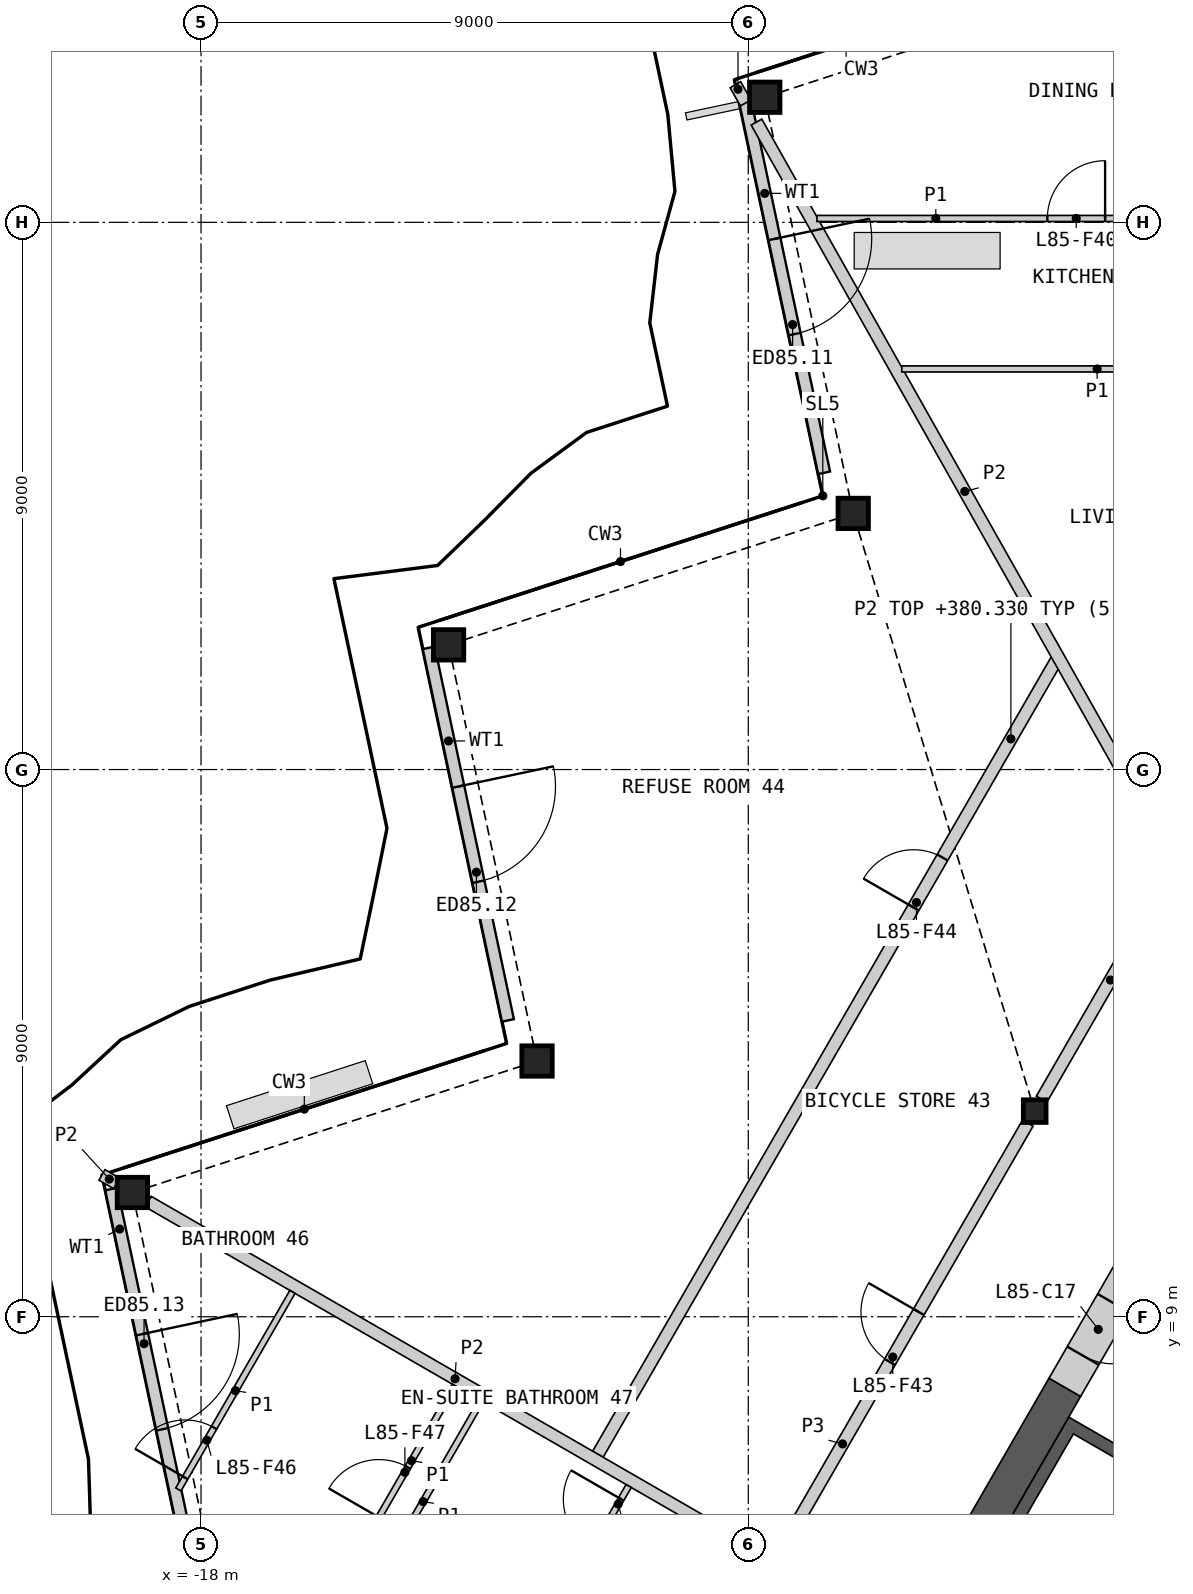
"""IFC4 building model, lengths in metres.
Left out: names, types, materials, properties, quantities, classifications, styles, units other than length and angle.
Written with IfcOpenShell. Run it as: python <this file> out.ifc"""

import sys

from ifc_helpers import new_model, si_unit, direction, frame, frame_2d, origin, origin_2d, place, context, subcontext, project, spatial, polyline, rectangle, hollow_rectangle, i_section, outline, extrude, element, fill, save


model = new_model("IFC4")
c1 = context("Model", 3, precision=1e-05, world=origin(), true_north=direction((0.0, 1.0)))
c2 = subcontext(c1, "Body", "Model", "MODEL_VIEW")
j1 = project(units=[si_unit("LENGTHUNIT", "METRE"), si_unit("PLANEANGLEUNIT", "RADIAN")], contexts=[c1])
p1 = place(None, origin())
s1 = spatial("IfcSite", under=j1, at=p1, CompositionType="ELEMENT")
p2 = place(p1, origin())
s2 = spatial("IfcBuilding", under=s1, at=p2, CompositionType="ELEMENT")
p3 = place(p2, frame((0.0, 0.0, 378.0)))
s3 = spatial("IfcBuildingStorey", under=s2, at=p3, CompositionType="ELEMENT", Elevation=378.0)
for number, where, z_axis, x_axis in (
    (1, (-8.729, 29.057, 0.0), (0.0, 0.0, 1.0), (1.0, 0.0, 0.0)),
    (2, (-7.274, 22.213, 0.0), (0.0, 0.0, 1.0), (1.0, 0.0, 0.0)),
    (3, (-13.929, 20.051, 0.0), (0.0, 0.0, 1.0), (1.0, 0.0, 0.0)),
    (4, (-12.474, 13.206, 0.0), (0.0, 0.0, 1.0), (1.0, 0.0, 0.0)),
    (5, (-19.129, 11.044, 0.0), (0.0, 0.0, 1.0), (1.0, 0.0, 0.0)),
):
    element("IfcColumn", number, at=place(p3, frame(where, z_axis=z_axis, x_axis=x_axis)), inside=s3, PredefinedType="COLUMN", context=c2, shape_type="SweptSolid", body=[
        extrude(hollow_rectangle(XDim=0.5, YDim=0.5, WallThickness=0.03, at=origin_2d()), origin(), (0.0, 0.0, 1.0), 3.4),
    ])
p4 = place(p3, frame((-4.289, 12.382, 0.0), z_axis=(0.0, 0.0, 1.0), x_axis=(1.0, 0.0, 0.0)))
e6 = element("IfcColumn", 6, at=p4, inside=s3, PredefinedType="COLUMN", context=c2, shape_type="SweptSolid", body=[
    extrude(i_section(OverallWidth=0.374, OverallDepth=0.372, WebThickness=0.016, FlangeThickness=0.026, at=origin_2d()), origin(), (0.0, 0.0, 1.0), 3.4),
])
p5 = place(p3, frame((-9.055, 29.009, 0.0), z_axis=(0.0, 0.0, 1.0), x_axis=(0.207926797195, -0.978144389652, 0.0)))
e7 = element("IfcWall", 7, at=p5, inside=s3, PredefinedType="SOLIDWALL", context=c2, shape_type="SweptSolid", body=[
    extrude(rectangle(XDim=6.265, YDim=0.2, at=frame_2d((3.133, 0.0))), origin(), (0.0, 0.0, 1.0), 2.634),
])
p6 = place(p5, frame((2.333, 0.0, 0.0)))
e8 = element("IfcOpeningElement", 8, at=p6, cuts=e7, PredefinedType="OPENING", context=c2, shape_type="SweptSolid", body=[
    extrude(rectangle(XDim=1.6, YDim=2.25, at=frame_2d((0.8, 1.125))), frame((0.0, 0.11, 0.0), z_axis=(0.0, -1.0, 0.0), x_axis=(1.0, 0.0, 0.0)), (0.0, 0.0, 1.0), 0.22),
])
p7 = place(p3, frame((-14.255, 20.002, 0.0), z_axis=(0.0, 0.0, 1.0), x_axis=(0.207926797195, -0.978144389652, 0.0)))
e9 = element("IfcWall", 9, at=p7, inside=s3, PredefinedType="SOLIDWALL", context=c2, shape_type="SweptSolid", body=[
    extrude(rectangle(XDim=6.265, YDim=0.2, at=frame_2d((3.133, 0.0))), origin(), (0.0, 0.0, 1.0), 2.634),
])
p8 = place(p7, frame((2.333, 0.0, 0.0)))
e10 = element("IfcOpeningElement", 10, at=p8, cuts=e9, PredefinedType="OPENING", context=c2, shape_type="SweptSolid", body=[
    extrude(rectangle(XDim=1.6, YDim=2.25, at=frame_2d((0.8, 1.125))), frame((0.0, 0.11, 0.0), z_axis=(0.0, -1.0, 0.0), x_axis=(1.0, 0.0, 0.0)), (0.0, 0.0, 1.0), 0.22),
])
p9 = place(p3, frame((-19.477, 11.1, 0.0), z_axis=(0.0, 0.0, 1.0), x_axis=(0.207910061304, -0.978147947096, 0.0)))
e11 = element("IfcWall", 11, at=p9, inside=s3, PredefinedType="SOLIDWALL", context=c2, shape_type="SweptSolid", body=[
    extrude(rectangle(XDim=6.716, YDim=0.2, at=frame_2d((3.358, 0.0))), origin(), (0.0, 0.0, 1.0), 2.634),
])
p10 = place(p9, frame((2.439, 0.0, 0.0)))
e12 = element("IfcOpeningElement", 12, at=p10, cuts=e11, PredefinedType="OPENING", context=c2, shape_type="SweptSolid", body=[
    extrude(rectangle(XDim=1.6, YDim=2.25, at=frame_2d((0.8, 1.125))), frame((0.0, 0.11, 0.0), z_axis=(0.0, -1.0, 0.0), x_axis=(1.0, 0.0, 0.0)), (0.0, 0.0, 1.0), 0.22),
])
p11 = place(p3, origin())
e13 = element("IfcWall", 13, at=p11, inside=s3, PredefinedType="SHEAR", context=c2, shape_type="SweptSolid", body=[
    extrude(outline(polyline([(-4.96, 0.208), (-7.131, 1.461), (-3.731, 7.35), (-1.561, 6.097), (-1.66, 5.924), (-3.652, 7.074), (-6.852, 1.531), (-4.861, 0.381), (-4.96, 0.208)])), origin(), (0.0, 0.0, 1.0), 3.1),
])
p12 = place(p3, frame((-1.631, 5.776, 0.0), z_axis=(0.0, 0.0, 1.0), x_axis=(-0.499992876559, -0.866029516466, 0.0)))
e14 = element("IfcWall", 14, at=p12, inside=s3, PredefinedType="SOLIDWALL", context=c2, shape_type="SweptSolid", body=[
    extrude(rectangle(XDim=6.486, YDim=0.2, at=frame_2d((3.243, 0.0))), origin(), (0.0, 0.0, 1.0), 3.1),
])
p13 = place(p12, frame((2.637, 0.0, 0.0)))
e15 = element("IfcOpeningElement", 15, at=p13, cuts=e14, PredefinedType="OPENING", context=c2, shape_type="SweptSolid", body=[
    extrude(rectangle(XDim=0.9, YDim=2.1, at=frame_2d((0.45, 1.05))), frame((0.0, 0.11, 0.0), z_axis=(0.0, -1.0, 0.0), x_axis=(1.0, 0.0, 0.0)), (0.0, 0.0, 1.0), 0.22),
])
p14 = place(p3, frame((-3.794, 7.84, 0.0), z_axis=(0.0, 0.0, 1.0), x_axis=(-0.499974747889, -0.866039982607, 0.0)))
e16 = element("IfcWall", 16, at=p14, inside=s3, PredefinedType="SHEAR", context=c2, shape_type="SweptSolid", body=[
    extrude(rectangle(XDim=7.092, YDim=0.6, at=frame_2d((3.546, 0.0))), origin(), (0.0, 0.0, 1.0), 3.1),
])
p15 = place(p3, frame((-2.694, 9.745, 0.0), z_axis=(0.0, 0.0, 1.0), x_axis=(-0.50002983664, -0.866008176907, 0.0)))
e17 = element("IfcWall", 17, at=p15, inside=s3, PredefinedType="SHEAR", context=c2, shape_type="SweptSolid", body=[
    extrude(rectangle(XDim=2.2, YDim=0.6, at=frame_2d((1.1, 0.0))), origin(), (0.0, 0.0, 1.0), 3.1),
])
p16 = place(p15, frame((0.6, 0.0, 0.0)))
e18 = element("IfcOpeningElement", 18, at=p16, cuts=e17, PredefinedType="OPENING", context=c2, shape_type="SweptSolid", body=[
    extrude(rectangle(XDim=1.0, YDim=2.1, at=frame_2d((0.5, 1.05))), frame((0.0, 0.31, 0.0), z_axis=(0.0, -1.0, 0.0), x_axis=(1.0, 0.0, 0.0)), (0.0, 0.0, 1.0), 0.62),
])
p17 = place(p3, frame((-8.465, 5.15, 0.0), z_axis=(0.0, 0.0, 1.0), x_axis=(0.499992155518, 0.866029932751, 0.0)))
e19 = element("IfcWall", 19, at=p17, inside=s3, PredefinedType="PARTITIONING", context=c2, shape_type="SweptSolid", body=[
    extrude(rectangle(XDim=8.123, YDim=0.2, at=frame_2d((4.062, 0.0))), origin(), (0.0, 0.0, 1.0), 3.1),
])
p18 = place(p17, frame((3.587, 0.0, 0.0)))
e20 = element("IfcOpeningElement", 20, at=p18, cuts=e19, PredefinedType="OPENING", context=c2, shape_type="SweptSolid", body=[
    extrude(rectangle(XDim=0.95, YDim=2.1, at=frame_2d((0.475, 1.05))), frame((0.0, 0.11, 0.0), z_axis=(0.0, -1.0, 0.0), x_axis=(1.0, 0.0, 0.0)), (0.0, 0.0, 1.0), 0.22),
])
p19 = place(p3, frame((-4.176, 12.579, 0.0), z_axis=(0.0, 0.0, 1.0), x_axis=(0.499974648164, 0.866040040179, 0.0)))
e21 = element("IfcWall", 21, at=p19, inside=s3, PredefinedType="PARTITIONING", context=c2, shape_type="SweptSolid", body=[
    extrude(rectangle(XDim=4.525, YDim=0.2, at=frame_2d((2.263, 0.0))), origin(), (0.0, 0.0, 1.0), 3.1),
])
p20 = place(p3, frame((-11.473, 6.74, 0.0), z_axis=(0.0, 0.0, 1.0), x_axis=(0.500001082559, 0.866024778768, 0.0)))
e22 = element("IfcWall", 22, at=p20, inside=s3, PredefinedType="PARTITIONING", context=c2, shape_type="SweptSolid", body=[
    extrude(rectangle(XDim=15.094, YDim=0.2, at=frame_2d((7.547, 0.0))), origin(), (0.0, 0.0, 1.0), 2.33),
])
p21 = place(p20, frame((10.383, 0.0, 0.0)))
e23 = element("IfcOpeningElement", 23, at=p21, cuts=e22, PredefinedType="OPENING", context=c2, shape_type="SweptSolid", body=[
    extrude(rectangle(XDim=0.95, YDim=2.1, at=frame_2d((0.475, 1.05))), frame((0.0, 0.11, 0.0), z_axis=(0.0, -1.0, 0.0), x_axis=(1.0, 0.0, 0.0)), (0.0, 0.0, 1.0), 0.22),
])
p22 = place(p3, frame((-8.865, 28.649, 0.0), z_axis=(0.0, 0.0, 1.0), x_axis=(0.491236420263, -0.871026279401, 0.0)))
e24 = element("IfcWall", 24, at=p22, inside=s3, PredefinedType="PARTITIONING", context=c2, shape_type="SweptSolid", body=[
    extrude(rectangle(XDim=13.95, YDim=0.2, at=frame_2d((6.975, 0.0))), origin(), (0.0, 0.0, 1.0), 2.33),
])
p23 = place(p3, frame((-18.869, 10.894, 0.0), z_axis=(0.0, 0.0, 1.0), x_axis=(0.866023724155, -0.500002909193, 0.0)))
e25 = element("IfcWall", 25, at=p23, inside=s3, PredefinedType="PARTITIONING", context=c2, shape_type="SweptSolid", body=[
    extrude(rectangle(XDim=11.655, YDim=0.2, at=frame_2d((5.827, 0.0))), origin(), (0.0, 0.0, 1.0), 2.33),
])
p24 = place(p3, frame((-9.211, 29.263, 0.0), z_axis=(0.0, 0.0, 1.0), x_axis=(0.4910719836, -0.871118996994, 0.0)))
e26 = element("IfcWall", 26, at=p24, inside=s3, PredefinedType="PARTITIONING", context=c2, shape_type="SweptSolid", body=[
    extrude(rectangle(XDim=0.343, YDim=0.2, at=frame_2d((0.171, 0.0))), origin(), (0.0, 0.0, 1.0), 2.33),
])
p25 = place(p3, frame((-19.629, 11.333, 0.0), z_axis=(0.0, 0.0, 1.0), x_axis=(0.866068339032, -0.499925626596, 0.0)))
e27 = element("IfcWall", 27, at=p25, inside=s3, PredefinedType="PARTITIONING", context=c2, shape_type="SweptSolid", body=[
    extrude(rectangle(XDim=0.277, YDim=0.2, at=frame_2d((0.139, 0.0))), origin(), (0.0, 0.0, 1.0), 2.33),
])
p26 = place(p3, frame((-7.871, 27.064, 0.0), z_axis=(0.0, 0.0, 1.0), x_axis=(1.0, 0.0, 0.0)))
e28 = element("IfcWall", 28, at=p26, inside=s3, PredefinedType="PARTITIONING", context=c2, shape_type="SweptSolid", body=[
    extrude(rectangle(XDim=7.821, YDim=0.1, at=frame_2d((3.91, 0.0))), origin(), (0.0, 0.0, 1.0), 2.33),
])
p27 = place(p26, frame((3.789, 0.0, 0.0)))
e29 = element("IfcOpeningElement", 29, at=p27, cuts=e28, PredefinedType="OPENING", context=c2, shape_type="SweptSolid", body=[
    extrude(rectangle(XDim=0.95, YDim=2.1, at=frame_2d((0.475, 1.05))), frame((0.0, 0.06, 0.0), z_axis=(0.0, -1.0, 0.0), x_axis=(1.0, 0.0, 0.0)), (0.0, 0.0, 1.0), 0.12),
])
p28 = place(p3, frame((-6.475, 24.589, 0.0), z_axis=(0.0, 0.0, 1.0), x_axis=(1.0, 0.0, 0.0)))
e30 = element("IfcWall", 30, at=p28, inside=s3, PredefinedType="PARTITIONING", context=c2, shape_type="SweptSolid", body=[
    extrude(rectangle(XDim=6.425, YDim=0.1, at=frame_2d((3.212, 0.0))), origin(), (0.0, 0.0, 1.0), 2.33),
])
p29 = place(p28, frame((3.499, 0.0, 0.0)))
e31 = element("IfcOpeningElement", 31, at=p29, cuts=e30, PredefinedType="OPENING", context=c2, shape_type="SweptSolid", body=[
    extrude(rectangle(XDim=0.95, YDim=2.1, at=frame_2d((0.475, 1.05))), frame((0.0, 0.06, 0.0), z_axis=(0.0, -1.0, 0.0), x_axis=(1.0, 0.0, 0.0)), (0.0, 0.0, 1.0), 0.12),
])
p30 = place(p3, frame((-18.372, 6.16, 0.0), z_axis=(0.0, 0.0, 1.0), x_axis=(0.499981580887, 0.866036037803, 0.0)))
e32 = element("IfcWall", 32, at=p30, inside=s3, PredefinedType="PARTITIONING", context=c2, shape_type="SweptSolid", body=[
    extrude(rectangle(XDim=3.752, YDim=0.1, at=frame_2d((1.876, 0.0))), origin(), (0.0, 0.0, 1.0), 2.33),
])
p31 = place(p30, frame((0.222, 0.0, 0.0)))
e33 = element("IfcOpeningElement", 33, at=p31, cuts=e32, PredefinedType="OPENING", context=c2, shape_type="SweptSolid", body=[
    extrude(rectangle(XDim=0.95, YDim=2.1, at=frame_2d((0.475, 1.05))), frame((0.0, 0.06, 0.0), z_axis=(0.0, -1.0, 0.0), x_axis=(1.0, 0.0, 0.0)), (0.0, 0.0, 1.0), 0.12),
])
p32 = place(p3, frame((-15.25, 5.398, 0.0), z_axis=(0.0, 0.0, 1.0), x_axis=(0.499935029643, 0.866062911188, 0.0)))
e34 = element("IfcWall", 34, at=p32, inside=s3, PredefinedType="PARTITIONING", context=c2, shape_type="SweptSolid", body=[
    extrude(rectangle(XDim=2.85, YDim=0.1, at=frame_2d((1.425, 0.0))), origin(), (0.0, 0.0, 1.0), 2.33),
])
p33 = place(p32, frame((0.35, 0.0, 0.0)))
e35 = element("IfcOpeningElement", 35, at=p33, cuts=e34, PredefinedType="OPENING", context=c2, shape_type="SweptSolid", body=[
    extrude(rectangle(XDim=0.95, YDim=2.1, at=frame_2d((0.475, 1.05))), frame((0.0, 0.06, 0.0), z_axis=(0.0, -1.0, 0.0), x_axis=(1.0, 0.0, 0.0)), (0.0, 0.0, 1.0), 0.12),
])
p34 = place(p3, frame((-12.242, 4.008, 0.0), z_axis=(0.0, 0.0, 1.0), x_axis=(0.499948979701, 0.866054858364, 0.0)))
e36 = element("IfcWall", 36, at=p34, inside=s3, PredefinedType="PARTITIONING", context=c2, shape_type="SweptSolid", body=[
    extrude(rectangle(XDim=2.55, YDim=0.1, at=frame_2d((1.275, 0.0))), origin(), (0.0, 0.0, 1.0), 2.33),
])
p35 = place(p34, frame((1.35, 0.0, 0.0)))
e37 = element("IfcOpeningElement", 37, at=p35, cuts=e36, PredefinedType="OPENING", context=c2, shape_type="SweptSolid", body=[
    extrude(rectangle(XDim=0.95, YDim=2.1, at=frame_2d((0.475, 1.05))), frame((0.0, 0.06, 0.0), z_axis=(0.0, -1.0, 0.0), x_axis=(1.0, 0.0, 0.0)), (0.0, 0.0, 1.0), 0.12),
])
p36 = place(p3, frame((-14.667, 5.408, 0.0), z_axis=(0.0, 0.0, 1.0), x_axis=(0.499948979701, 0.866054858364, 0.0)))
e38 = element("IfcWall", 38, at=p36, inside=s3, PredefinedType="PARTITIONING", context=c2, shape_type="SweptSolid", body=[
    extrude(rectangle(XDim=2.55, YDim=0.1, at=frame_2d((1.275, 0.0))), origin(), (0.0, 0.0, 1.0), 2.33),
])
p37 = place(p6, origin())
e39 = element("IfcDoor", 39, at=p37, inside=s3, OperationType="DOUBLE_DOOR_SINGLE_SWING", PredefinedType="DOOR", context=c2, shape_type="SweptSolid", body=[
    extrude(rectangle(XDim=1.6, YDim=2.25, at=frame_2d((0.8, 1.125))), frame((0.0, 0.025, 0.0), z_axis=(0.0, -1.0, 0.0), x_axis=(1.0, 0.0, 0.0)), (0.0, 0.0, 1.0), 0.05),
])
fill(e8, e39)
p38 = place(p8, origin())
e40 = element("IfcDoor", 40, at=p38, inside=s3, OperationType="DOUBLE_DOOR_SINGLE_SWING", PredefinedType="DOOR", context=c2, shape_type="SweptSolid", body=[
    extrude(rectangle(XDim=1.6, YDim=2.25, at=frame_2d((0.8, 1.125))), frame((0.0, 0.025, 0.0), z_axis=(0.0, -1.0, 0.0), x_axis=(1.0, 0.0, 0.0)), (0.0, 0.0, 1.0), 0.05),
])
fill(e10, e40)
p39 = place(p10, origin())
e41 = element("IfcDoor", 41, at=p39, inside=s3, OperationType="DOUBLE_DOOR_SINGLE_SWING", PredefinedType="DOOR", context=c2, shape_type="SweptSolid", body=[
    extrude(rectangle(XDim=1.6, YDim=2.25, at=frame_2d((0.8, 1.125))), frame((0.0, 0.025, 0.0), z_axis=(0.0, -1.0, 0.0), x_axis=(1.0, 0.0, 0.0)), (0.0, 0.0, 1.0), 0.05),
])
fill(e12, e41)
p40 = place(p16, origin())
e42 = element("IfcDoor", 42, at=p40, inside=s3, OperationType="SINGLE_SWING_LEFT", PredefinedType="DOOR", context=c2, shape_type="SweptSolid", body=[
    extrude(rectangle(XDim=1.0, YDim=2.1, at=frame_2d((0.5, 1.05))), frame((0.0, 0.055, 0.0), z_axis=(0.0, -1.0, 0.0), x_axis=(1.0, 0.0, 0.0)), (0.0, 0.0, 1.0), 0.05),
])
fill(e18, e42)
p41 = place(p27, origin())
e43 = element("IfcDoor", 43, at=p41, inside=s3, OperationType="SINGLE_SWING_RIGHT", PredefinedType="DOOR", context=c2, shape_type="SweptSolid", body=[
    extrude(rectangle(XDim=0.95, YDim=2.1, at=frame_2d((0.475, 1.05))), frame((0.0, 0.025, 0.0), z_axis=(0.0, -1.0, 0.0), x_axis=(1.0, 0.0, 0.0)), (0.0, 0.0, 1.0), 0.05),
])
fill(e29, e43)
p42 = place(p18, origin())
e44 = element("IfcDoor", 44, at=p42, inside=s3, OperationType="SINGLE_SWING_RIGHT", PredefinedType="DOOR", context=c2, shape_type="SweptSolid", body=[
    extrude(rectangle(XDim=0.95, YDim=2.1, at=frame_2d((0.475, 1.05))), frame((0.0, 0.025, 0.0), z_axis=(0.0, -1.0, 0.0), x_axis=(1.0, 0.0, 0.0)), (0.0, 0.0, 1.0), 0.05),
])
fill(e20, e44)
p43 = place(p21, origin())
e45 = element("IfcDoor", 45, at=p43, inside=s3, OperationType="SINGLE_SWING_LEFT", PredefinedType="DOOR", context=c2, shape_type="SweptSolid", body=[
    extrude(rectangle(XDim=0.95, YDim=2.1, at=frame_2d((0.475, 1.05))), frame((0.0, 0.025, 0.0), z_axis=(0.0, -1.0, 0.0), x_axis=(1.0, 0.0, 0.0)), (0.0, 0.0, 1.0), 0.05),
])
fill(e23, e45)
p44 = place(p31, origin())
e46 = element("IfcDoor", 46, at=p44, inside=s3, OperationType="SINGLE_SWING_LEFT", PredefinedType="DOOR", context=c2, shape_type="SweptSolid", body=[
    extrude(rectangle(XDim=0.95, YDim=2.1, at=frame_2d((0.475, 1.05))), frame((0.0, 0.025, 0.0), z_axis=(0.0, -1.0, 0.0), x_axis=(1.0, 0.0, 0.0)), (0.0, 0.0, 1.0), 0.05),
])
fill(e33, e46)
p45 = place(p33, origin())
e47 = element("IfcDoor", 47, at=p45, inside=s3, OperationType="SINGLE_SWING_LEFT", PredefinedType="DOOR", context=c2, shape_type="SweptSolid", body=[
    extrude(rectangle(XDim=0.95, YDim=2.1, at=frame_2d((0.475, 1.05))), frame((0.0, 0.025, 0.0), z_axis=(0.0, -1.0, 0.0), x_axis=(1.0, 0.0, 0.0)), (0.0, 0.0, 1.0), 0.05),
])
fill(e35, e47)
p46 = place(p35, origin())
e48 = element("IfcDoor", 48, at=p46, inside=s3, OperationType="SINGLE_SWING_RIGHT", PredefinedType="DOOR", context=c2, shape_type="SweptSolid", body=[
    extrude(rectangle(XDim=0.95, YDim=2.1, at=frame_2d((0.475, 1.05))), frame((0.0, 0.025, 0.0), z_axis=(0.0, -1.0, 0.0), x_axis=(1.0, 0.0, 0.0)), (0.0, 0.0, 1.0), 0.05),
])
fill(e37, e48)
save(model, sys.argv[1])
